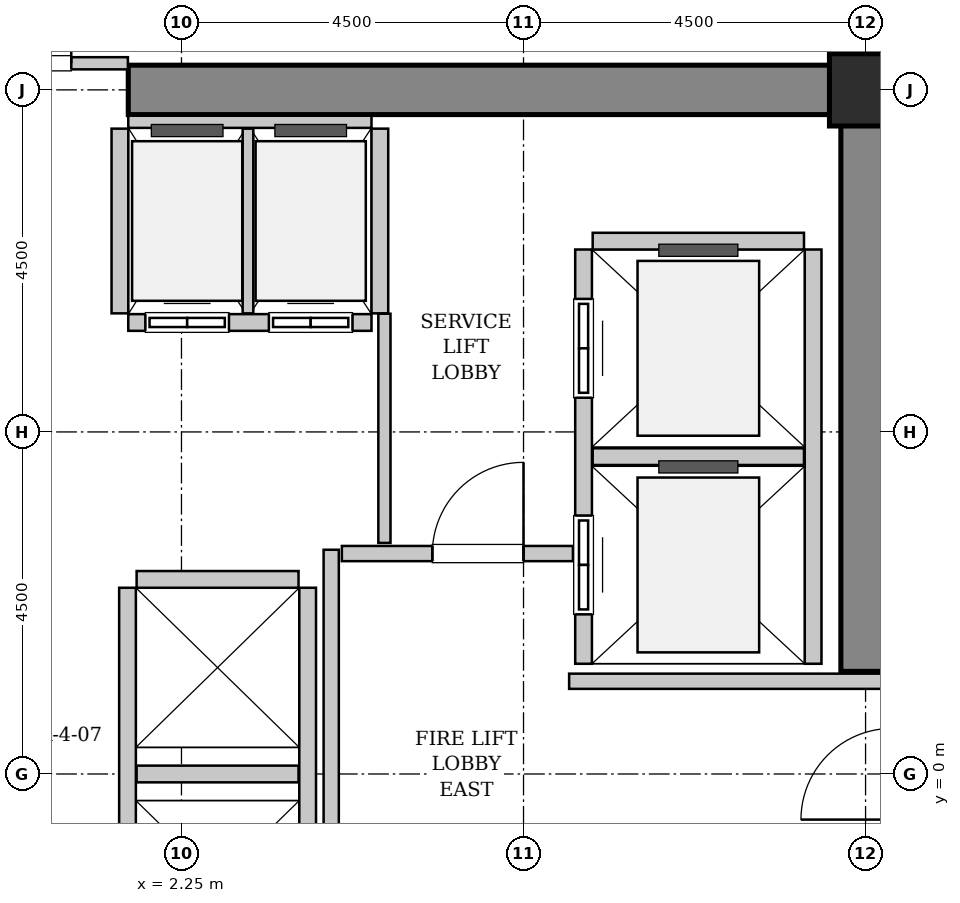
"""IFC4 building model, lengths in metres.
Left out: names, types, materials, properties, quantities, classifications, styles, units other than length and angle.
Written with IfcOpenShell. Run it as: python <this file> out.ifc"""

import sys

from ifc_helpers import new_model, si_unit, direction, frame, frame_2d, origin, origin_2d, place, context, subcontext, project, spatial, rectangle, hollow_rectangle, extrude, source, transform, mapped, element, fill, save


model = new_model("IFC4")
c1 = context("Model", 3, precision=1e-05, world=origin(), true_north=direction((0.0, 1.0)))
c2 = subcontext(c1, "Body", "Model", "MODEL_VIEW")
j1 = project(units=[si_unit("LENGTHUNIT", "METRE"), si_unit("PLANEANGLEUNIT", "RADIAN")], contexts=[c1])
p1 = place(None, origin())
s1 = spatial("IfcSite", under=j1, at=p1, CompositionType="ELEMENT")
p2 = place(p1, origin())
s2 = spatial("IfcBuilding", under=s1, at=p2, CompositionType="ELEMENT")
p3 = place(p2, frame((0.0, 0.0, 55.8)))
s3 = spatial("IfcBuildingStorey", under=s2, at=p3, CompositionType="ELEMENT", Elevation=55.8)
m1 = source(origin(), c2, "Body", "SweptSolid", [
    extrude(rectangle(XDim=10.025, YDim=0.65, at=frame_2d((5.012, 0.0))), origin(), (0.0, 0.0, 1.0), 3.8),
])
p4 = place(p3, frame((1.55, 9.0, 0.0), z_axis=(0.0, 0.0, 1.0), x_axis=(1.0, 0.0, 0.0)))
e1 = element("IfcWall", 1, at=p4, inside=s3, PredefinedType="SHEAR", context=c2, shape_type="MappedRepresentation", body=[
    mapped(m1, transform((0.0, 0.0, 0.0), x_axis=(1.0, 0.0, 0.0), y_axis=(0.0, 1.0, 0.0), z_axis=(0.0, 0.0, 1.0), scale=1.0)),
])
m2 = source(origin(), c2, "Body", "SweptSolid", [
    extrude(rectangle(XDim=7.325, YDim=0.65, at=frame_2d((3.663, 0.0))), origin(), (0.0, 0.0, 1.0), 3.8),
])
p5 = place(p3, frame((11.25, 1.35, 0.0), z_axis=(0.0, 0.0, 1.0), x_axis=(0.0, 1.0, 0.0)))
e2 = element("IfcWall", 2, at=p5, inside=s3, PredefinedType="SHEAR", context=c2, shape_type="MappedRepresentation", body=[
    mapped(m2, transform((0.0, 0.0, 0.0), x_axis=(1.0, 0.0, 0.0), y_axis=(0.0, 1.0, 0.0), z_axis=(0.0, 0.0, 1.0), scale=1.0)),
])
m3 = source(origin(), c2, "Body", "SweptSolid", [
    extrude(hollow_rectangle(XDim=0.95, YDim=0.95, WallThickness=0.045, InnerFilletRadius=0.045, OuterFilletRadius=0.09, at=origin_2d()), origin(), (0.0, 0.0, 1.0), 3.8),
])
p6 = place(p3, frame((11.25, 9.0, 0.0), z_axis=(0.0, 0.0, 1.0), x_axis=(1.0, 0.0, 0.0)))
e3 = element("IfcColumn", 3, at=p6, inside=s3, PredefinedType="COLUMN", context=c2, shape_type="MappedRepresentation", body=[
    mapped(m3, transform((0.0, 0.0, 0.0), x_axis=(1.0, 0.0, 0.0), y_axis=(0.0, 1.0, 0.0), z_axis=(0.0, 0.0, 1.0), scale=1.0)),
])
m4 = source(origin(), c2, "Body", "SweptSolid", [
    extrude(rectangle(XDim=5.45, YDim=0.22, at=frame_2d((2.725, 0.0))), origin(), (0.0, 0.0, 1.0), 3.535),
])
p7 = place(p3, frame((7.54, 6.9, 0.0), z_axis=(0.0, 0.0, 1.0), x_axis=(0.0, -1.0, 0.0)))
e4 = element("IfcWall", 4, at=p7, inside=s3, PredefinedType="SOLIDWALL", context=c2, shape_type="MappedRepresentation", body=[
    mapped(m4, transform((0.0, 0.0, 0.0), x_axis=(1.0, 0.0, 0.0), y_axis=(0.0, 1.0, 0.0), z_axis=(0.0, 0.0, 1.0), scale=1.0)),
])
p8 = place(p7, frame((3.5, 0.0, 0.0)))
e5 = element("IfcOpeningElement", 5, at=p8, cuts=e4, PredefinedType="OPENING", context=c2, shape_type="SweptSolid", body=[
    extrude(rectangle(XDim=1.3, YDim=2.3, at=frame_2d((0.65, 1.15))), frame((0.0, 0.12, 0.0), z_axis=(0.0, -1.0, 0.0), x_axis=(1.0, 0.0, 0.0)), (0.0, 0.0, 1.0), 0.24),
])
p9 = place(p7, frame((0.65, 0.0, 0.0)))
e6 = element("IfcOpeningElement", 6, at=p9, cuts=e4, PredefinedType="OPENING", context=c2, shape_type="SweptSolid", body=[
    extrude(rectangle(XDim=1.3, YDim=2.3, at=frame_2d((0.65, 1.15))), frame((0.0, 0.12, 0.0), z_axis=(0.0, -1.0, 0.0), x_axis=(1.0, 0.0, 0.0)), (0.0, 0.0, 1.0), 0.24),
])
p10 = place(p3, frame((10.56, 1.45, 0.0), z_axis=(0.0, 0.0, 1.0), x_axis=(0.0, 1.0, 0.0)))
e7 = element("IfcWall", 7, at=p10, inside=s3, PredefinedType="SOLIDWALL", context=c2, shape_type="MappedRepresentation", body=[
    mapped(m4, transform((0.0, 0.0, 0.0), x_axis=(1.0, 0.0, 0.0), y_axis=(0.0, 1.0, 0.0), z_axis=(0.0, 0.0, 1.0), scale=1.0)),
])
m5 = source(origin(), c2, "Body", "SweptSolid", [
    extrude(rectangle(XDim=2.78, YDim=0.22, at=frame_2d((1.39, 0.0))), origin(), (0.0, 0.0, 1.0), 3.535),
])
for number, where, z_axis, x_axis in (
    (8, (7.66, 4.175, 0.0), (0.0, 0.0, 1.0), (1.0, 0.0, 0.0)),
    (9, (10.44, 7.01, 0.0), (0.0, 0.0, 1.0), (-1.0, 0.0, 0.0)),
):
    element("IfcWall", number, at=place(p3, frame(where, z_axis=z_axis, x_axis=x_axis)), inside=s3, PredefinedType="SOLIDWALL", context=c2, shape_type="MappedRepresentation", body=[
        mapped(m5, transform((0.0, 0.0, 0.0), x_axis=(1.0, 0.0, 0.0), y_axis=(0.0, 1.0, 0.0), z_axis=(0.0, 0.0, 1.0), scale=1.0)),
    ])
m6 = source(origin(), c2, "Body", "SweptSolid", [
    extrude(rectangle(XDim=3.2, YDim=0.22, at=frame_2d((1.6, 0.0))), origin(), (0.0, 0.0, 1.0), 3.535),
])
p11 = place(p3, frame((1.55, 5.94, 0.0), z_axis=(0.0, 0.0, 1.0), x_axis=(1.0, 0.0, 0.0)))
e10 = element("IfcWall", 10, at=p11, inside=s3, PredefinedType="SOLIDWALL", context=c2, shape_type="MappedRepresentation", body=[
    mapped(m6, transform((0.0, 0.0, 0.0), x_axis=(1.0, 0.0, 0.0), y_axis=(0.0, 1.0, 0.0), z_axis=(0.0, 0.0, 1.0), scale=1.0)),
])
p12 = place(p11, frame((0.225, 0.0, 0.0)))
e11 = element("IfcOpeningElement", 11, at=p12, cuts=e10, PredefinedType="OPENING", context=c2, shape_type="SweptSolid", body=[
    extrude(rectangle(XDim=1.1, YDim=2.2, at=frame_2d((0.55, 1.1))), frame((0.0, 0.12, 0.0), z_axis=(0.0, -1.0, 0.0), x_axis=(1.0, 0.0, 0.0)), (0.0, 0.0, 1.0), 0.24),
])
p13 = place(p11, frame((1.85, 0.0, 0.0)))
e12 = element("IfcOpeningElement", 12, at=p13, cuts=e10, PredefinedType="OPENING", context=c2, shape_type="SweptSolid", body=[
    extrude(rectangle(XDim=1.1, YDim=2.2, at=frame_2d((0.55, 1.1))), frame((0.0, 0.12, 0.0), z_axis=(0.0, -1.0, 0.0), x_axis=(1.0, 0.0, 0.0)), (0.0, 0.0, 1.0), 0.24),
])
m7 = source(origin(), c2, "Body", "SweptSolid", [
    extrude(rectangle(XDim=3.2, YDim=0.16, at=frame_2d((1.6, 0.0))), origin(), (0.0, 0.0, 1.0), 2.425),
])
p14 = place(p3, frame((4.75, 8.58, 0.0), z_axis=(0.0, 0.0, 1.0), x_axis=(-1.0, 0.0, 0.0)))
e13 = element("IfcWall", 13, at=p14, inside=s3, PredefinedType="PARTITIONING", context=c2, shape_type="MappedRepresentation", body=[
    mapped(m7, transform((0.0, 0.0, 0.0), x_axis=(1.0, 0.0, 0.0), y_axis=(0.0, 1.0, 0.0), z_axis=(0.0, 0.0, 1.0), scale=1.0)),
])
m8 = source(origin(), c2, "Body", "SweptSolid", [
    extrude(rectangle(XDim=2.43, YDim=0.22, at=frame_2d((1.215, 0.0))), origin(), (0.0, 0.0, 1.0), 3.535),
])
p15 = place(p3, frame((1.44, 8.49, 0.0), z_axis=(0.0, 0.0, 1.0), x_axis=(0.0, -1.0, 0.0)))
e14 = element("IfcWall", 14, at=p15, inside=s3, PredefinedType="SOLIDWALL", context=c2, shape_type="MappedRepresentation", body=[
    mapped(m8, transform((0.0, 0.0, 0.0), x_axis=(1.0, 0.0, 0.0), y_axis=(0.0, 1.0, 0.0), z_axis=(0.0, 0.0, 1.0), scale=1.0)),
])
m9 = source(origin(), c2, "Body", "SweptSolid", [
    extrude(rectangle(XDim=2.43, YDim=0.14, at=frame_2d((1.215, 0.0))), origin(), (0.0, 0.0, 1.0), 3.535),
])
p16 = place(p3, frame((3.125, 6.06, 0.0), z_axis=(0.0, 0.0, 1.0), x_axis=(0.0, 1.0, 0.0)))
e15 = element("IfcWall", 15, at=p16, inside=s3, PredefinedType="PARTITIONING", context=c2, shape_type="MappedRepresentation", body=[
    mapped(m9, transform((0.0, 0.0, 0.0), x_axis=(1.0, 0.0, 0.0), y_axis=(0.0, 1.0, 0.0), z_axis=(0.0, 0.0, 1.0), scale=1.0)),
])
p17 = place(p3, frame((4.86, 6.06, 0.0), z_axis=(0.0, 0.0, 1.0), x_axis=(0.0, 1.0, 0.0)))
e16 = element("IfcWall", 16, at=p17, inside=s3, PredefinedType="SOLIDWALL", context=c2, shape_type="MappedRepresentation", body=[
    mapped(m8, transform((0.0, 0.0, 0.0), x_axis=(1.0, 0.0, 0.0), y_axis=(0.0, 1.0, 0.0), z_axis=(0.0, 0.0, 1.0), scale=1.0)),
])
m10 = source(origin(), c2, "Body", "SweptSolid", [
    extrude(rectangle(XDim=4.9, YDim=0.22, at=frame_2d((2.45, 0.0))), origin(), (0.0, 0.0, 1.0), 3.535),
])
for number, where, z_axis, x_axis in (
    (17, (1.54, 2.45, 0.0), (0.0, 0.0, 1.0), (0.0, -1.0, 0.0)),
    (18, (3.91, -2.45, 0.0), (0.0, 0.0, 1.0), (0.0, 1.0, 0.0)),
):
    element("IfcWall", number, at=place(p3, frame(where, z_axis=z_axis, x_axis=x_axis)), inside=s3, PredefinedType="SOLIDWALL", context=c2, shape_type="MappedRepresentation", body=[
        mapped(m10, transform((0.0, 0.0, 0.0), x_axis=(1.0, 0.0, 0.0), y_axis=(0.0, 1.0, 0.0), z_axis=(0.0, 0.0, 1.0), scale=1.0)),
    ])
m11 = source(origin(), c2, "Body", "SweptSolid", [
    extrude(rectangle(XDim=2.13, YDim=0.22, at=frame_2d((1.065, 0.0))), origin(), (0.0, 0.0, 1.0), 3.535),
])
for number, where, z_axis, x_axis in (
    (19, (1.66, 0.0, 0.0), (0.0, 0.0, 1.0), (1.0, 0.0, 0.0)),
    (20, (3.79, 2.56, 0.0), (0.0, 0.0, 1.0), (-1.0, 0.0, 0.0)),
):
    element("IfcWall", number, at=place(p3, frame(where, z_axis=z_axis, x_axis=x_axis)), inside=s3, PredefinedType="SOLIDWALL", context=c2, shape_type="MappedRepresentation", body=[
        mapped(m11, transform((0.0, 0.0, 0.0), x_axis=(1.0, 0.0, 0.0), y_axis=(0.0, 1.0, 0.0), z_axis=(0.0, 0.0, 1.0), scale=1.0)),
    ])
m12 = source(origin(), c2, "Body", "SweptSolid", [
    extrude(rectangle(XDim=5.9, YDim=0.2, at=frame_2d((2.95, 0.0))), origin(), (0.0, 0.0, 1.0), 3.535),
])
p18 = place(p3, frame((4.22, -2.95, 0.0), z_axis=(0.0, 0.0, 1.0), x_axis=(0.0, 1.0, 0.0)))
e21 = element("IfcWall", 21, at=p18, inside=s3, PredefinedType="PARTITIONING", context=c2, shape_type="MappedRepresentation", body=[
    mapped(m12, transform((0.0, 0.0, 0.0), x_axis=(1.0, 0.0, 0.0), y_axis=(0.0, 1.0, 0.0), z_axis=(0.0, 0.0, 1.0), scale=1.0)),
])
m13 = source(origin(), c2, "Body", "SweptSolid", [
    extrude(rectangle(XDim=3.04, YDim=0.2, at=frame_2d((1.52, 0.0))), origin(), (0.0, 0.0, 1.0), 3.535),
])
p19 = place(p3, frame((4.36, 2.9, 0.0), z_axis=(0.0, 0.0, 1.0), x_axis=(1.0, 0.0, 0.0)))
e22 = element("IfcWall", 22, at=p19, inside=s3, PredefinedType="PARTITIONING", context=c2, shape_type="MappedRepresentation", body=[
    mapped(m13, transform((0.0, 0.0, 0.0), x_axis=(1.0, 0.0, 0.0), y_axis=(0.0, 1.0, 0.0), z_axis=(0.0, 0.0, 1.0), scale=1.0)),
])
p20 = place(p19, frame((1.19, 0.0, 0.0)))
e23 = element("IfcOpeningElement", 23, at=p20, cuts=e22, PredefinedType="OPENING", context=c2, shape_type="SweptSolid", body=[
    extrude(rectangle(XDim=1.2, YDim=2.15, at=frame_2d((0.6, 1.075))), frame((0.0, 0.11, 0.0), z_axis=(0.0, -1.0, 0.0), x_axis=(1.0, 0.0, 0.0)), (0.0, 0.0, 1.0), 0.22),
])
m14 = source(origin(), c2, "Body", "SweptSolid", [
    extrude(rectangle(XDim=4.11, YDim=0.2, at=frame_2d((2.055, 0.0))), origin(), (0.0, 0.0, 1.0), 3.535),
])
p21 = place(p3, frame((7.35, 1.22, 0.0), z_axis=(0.0, 0.0, 1.0), x_axis=(1.0, 0.0, 0.0)))
e24 = element("IfcWall", 24, at=p21, inside=s3, PredefinedType="PARTITIONING", context=c2, shape_type="MappedRepresentation", body=[
    mapped(m14, transform((0.0, 0.0, 0.0), x_axis=(1.0, 0.0, 0.0), y_axis=(0.0, 1.0, 0.0), z_axis=(0.0, 0.0, 1.0), scale=1.0)),
])
m15 = source(origin(), c2, "Body", "SweptSolid", [
    extrude(rectangle(XDim=3.09, YDim=0.16, at=frame_2d((1.545, 0.0))), origin(), (0.0, 0.0, 1.0), 2.425),
])
p22 = place(p3, frame((-1.545, 9.35, 0.0), z_axis=(0.0, 0.0, 1.0), x_axis=(1.0, 0.0, 0.0)))
e25 = element("IfcWall", 25, at=p22, inside=s3, PredefinedType="PARTITIONING", context=c2, shape_type="MappedRepresentation", body=[
    mapped(m15, transform((0.0, 0.0, 0.0), x_axis=(1.0, 0.0, 0.0), y_axis=(0.0, 1.0, 0.0), z_axis=(0.0, 0.0, 1.0), scale=1.0)),
])
p23 = place(p22, frame((0.745, 0.0, 0.0)))
e26 = element("IfcOpeningElement", 26, at=p23, cuts=e25, PredefinedType="OPENING", context=c2, shape_type="SweptSolid", body=[
    extrude(rectangle(XDim=1.6, YDim=2.3, at=frame_2d((0.8, 1.15))), frame((0.0, 0.09, 0.0), z_axis=(0.0, -1.0, 0.0), x_axis=(1.0, 0.0, 0.0)), (0.0, 0.0, 1.0), 0.18),
])
m16 = source(origin(), c2, "Body", "SweptSolid", [
    extrude(rectangle(XDim=3.015, YDim=0.16, at=frame_2d((1.507, 0.0))), origin(), (0.0, 0.0, 1.0), 3.535),
])
p24 = place(p3, frame((4.92, 3.04, 0.0), z_axis=(0.0, 0.0, 1.0), x_axis=(0.0, 1.0, 0.0)))
e27 = element("IfcWall", 27, at=p24, inside=s3, PredefinedType="PARTITIONING", context=c2, shape_type="MappedRepresentation", body=[
    mapped(m16, transform((0.0, 0.0, 0.0), x_axis=(1.0, 0.0, 0.0), y_axis=(0.0, 1.0, 0.0), z_axis=(0.0, 0.0, 1.0), scale=1.0)),
])
m17 = source(origin(), c2, "Body", "SweptSolid", [
    extrude(rectangle(XDim=1.3, YDim=2.3, at=frame_2d((0.65, 1.15))), frame((0.0, 0.025, 0.0), z_axis=(0.0, -1.0, 0.0), x_axis=(1.0, 0.0, 0.0)), (0.0, 0.0, 1.0), 0.05),
])
p25 = place(p8, origin())
e28 = element("IfcDoor", 28, at=p25, inside=s3, OperationType="SLIDING_TO_RIGHT", PredefinedType="DOOR", context=c2, shape_type="MappedRepresentation", body=[
    mapped(m17, transform((0.0, 0.0, 0.0), x_axis=(1.0, 0.0, 0.0), y_axis=(0.0, 1.0, 0.0), z_axis=(0.0, 0.0, 1.0), scale=1.0)),
])
fill(e5, e28)
p26 = place(p9, origin())
e29 = element("IfcDoor", 29, at=p26, inside=s3, OperationType="SLIDING_TO_RIGHT", PredefinedType="DOOR", context=c2, shape_type="MappedRepresentation", body=[
    mapped(m17, transform((0.0, 0.0, 0.0), x_axis=(1.0, 0.0, 0.0), y_axis=(0.0, 1.0, 0.0), z_axis=(0.0, 0.0, 1.0), scale=1.0)),
])
fill(e6, e29)
m18 = source(origin(), c2, "Body", "SweptSolid", [
    extrude(rectangle(XDim=1.1, YDim=2.2, at=frame_2d((0.55, 1.1))), frame((0.0, 0.025, 0.0), z_axis=(0.0, -1.0, 0.0), x_axis=(1.0, 0.0, 0.0)), (0.0, 0.0, 1.0), 0.05),
])
p27 = place(p12, origin())
e30 = element("IfcDoor", 30, at=p27, inside=s3, OperationType="DOUBLE_DOOR_SLIDING", PredefinedType="DOOR", context=c2, shape_type="MappedRepresentation", body=[
    mapped(m18, transform((0.0, 0.0, 0.0), x_axis=(1.0, 0.0, 0.0), y_axis=(0.0, 1.0, 0.0), z_axis=(0.0, 0.0, 1.0), scale=1.0)),
])
fill(e11, e30)
p28 = place(p13, origin())
e31 = element("IfcDoor", 31, at=p28, inside=s3, OperationType="DOUBLE_DOOR_SLIDING", PredefinedType="DOOR", context=c2, shape_type="MappedRepresentation", body=[
    mapped(m18, transform((0.0, 0.0, 0.0), x_axis=(1.0, 0.0, 0.0), y_axis=(0.0, 1.0, 0.0), z_axis=(0.0, 0.0, 1.0), scale=1.0)),
])
fill(e12, e31)
m19 = source(origin(), c2, "Body", "SweptSolid", [
    extrude(rectangle(XDim=1.2, YDim=2.15, at=frame_2d((0.6, 1.075))), frame((0.0, 0.025, 0.0), z_axis=(0.0, -1.0, 0.0), x_axis=(1.0, 0.0, 0.0)), (0.0, 0.0, 1.0), 0.05),
])
p29 = place(p20, origin())
e32 = element("IfcDoor", 32, at=p29, inside=s3, OperationType="SINGLE_SWING_RIGHT", PredefinedType="DOOR", context=c2, shape_type="MappedRepresentation", body=[
    mapped(m19, transform((0.0, 0.0, 0.0), x_axis=(1.0, 0.0, 0.0), y_axis=(0.0, 1.0, 0.0), z_axis=(0.0, 0.0, 1.0), scale=1.0)),
])
fill(e23, e32)
m20 = source(origin(), c2, "Body", "SweptSolid", [
    extrude(rectangle(XDim=1.6, YDim=2.3, at=frame_2d((0.8, 1.15))), frame((0.0, 0.025, 0.0), z_axis=(0.0, -1.0, 0.0), x_axis=(1.0, 0.0, 0.0)), (0.0, 0.0, 1.0), 0.05),
])
p30 = place(p23, origin())
e33 = element("IfcDoor", 33, at=p30, inside=s3, OperationType="DOUBLE_DOOR_SINGLE_SWING", PredefinedType="DOOR", context=c2, shape_type="MappedRepresentation", body=[
    mapped(m20, transform((0.0, 0.0, 0.0), x_axis=(1.0, 0.0, 0.0), y_axis=(0.0, 1.0, 0.0), z_axis=(0.0, 0.0, 1.0), scale=1.0)),
])
fill(e26, e33)
save(model, sys.argv[1])
